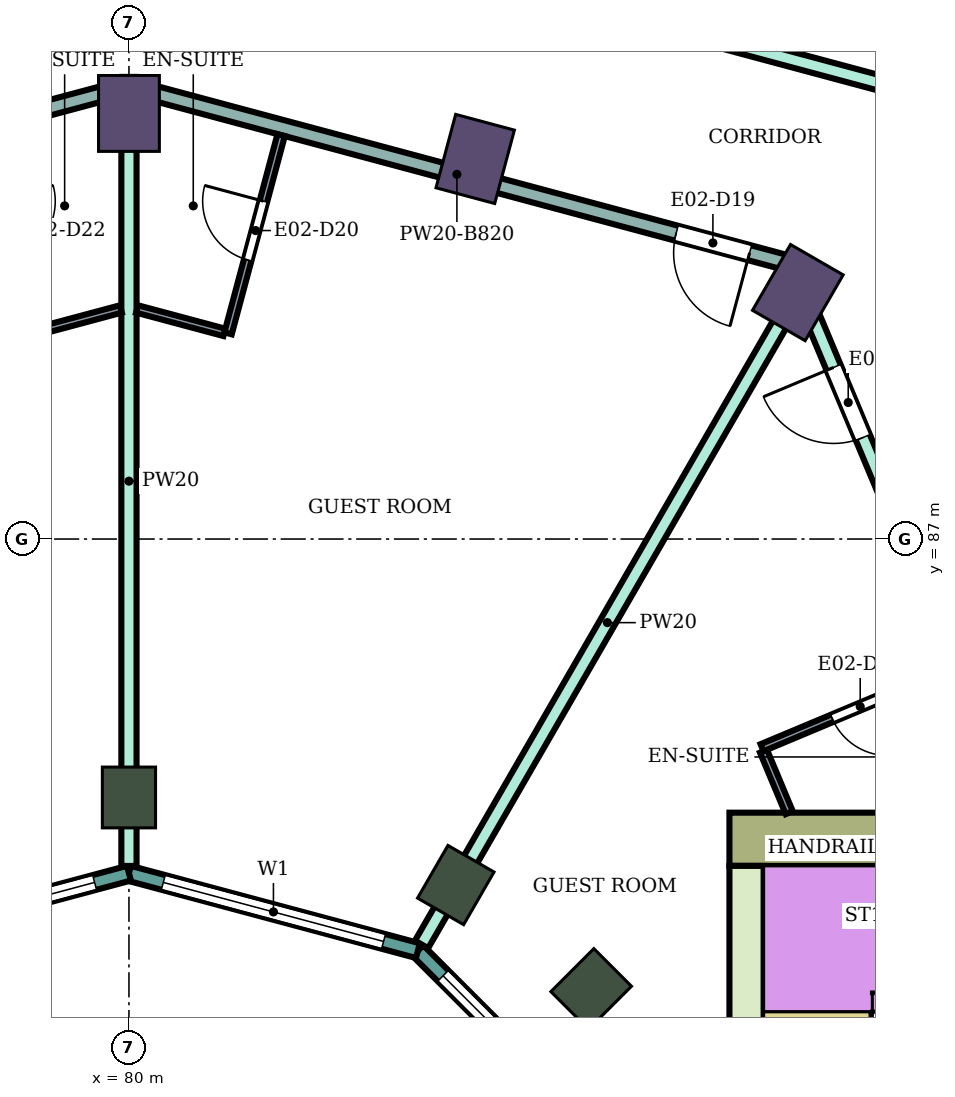
"""IFC4 building model, lengths in metres.
Left out: names, types, materials, properties, quantities, classifications, styles, units other than length and angle.
Written with IfcOpenShell. Run it as: python <this file> out.ifc"""

import sys

from ifc_helpers import new_model, si_unit, direction, frame, frame_2d, origin, origin_2d, place, context, subcontext, project, spatial, rectangle, extrude, element, fill, save


model = new_model("IFC4")
c1 = context("Model", 3, precision=1e-05, world=origin(), true_north=direction((0.0, 1.0)))
c2 = subcontext(c1, "Body", "Model", "MODEL_VIEW")
j1 = project(units=[si_unit("LENGTHUNIT", "METRE"), si_unit("PLANEANGLEUNIT", "RADIAN")], contexts=[c1])
p1 = place(None, origin())
s1 = spatial("IfcSite", under=j1, at=p1, CompositionType="ELEMENT")
p2 = place(p1, origin())
s2 = spatial("IfcBuilding", under=s1, at=p2, CompositionType="ELEMENT")
p3 = place(p2, frame((0.0, 0.0, 126.3)))
s3 = spatial("IfcBuildingStorey", under=s2, at=p3, CompositionType="ELEMENT", Elevation=126.3)
for number, where, z_axis, x_axis in (
    (1, (88.8, 90.242, 0.0), (0.0, 0.0, 1.0), (0.5, 0.866, 0.0)),
    (2, (84.555, 92.0, 0.0), (0.0, 0.0, 1.0), (0.259, 0.966, 0.0)),
    (3, (80.0, 92.6, 0.0), (0.0, 0.0, 1.0), (0.0, 1.0, 0.0)),
):
    element("IfcColumn", number, at=place(p3, frame(where, z_axis=z_axis, x_axis=x_axis)), inside=s3, PredefinedType="COLUMN", context=c2, shape_type="SweptSolid", body=[
        extrude(rectangle(XDim=1.0, YDim=0.8, at=origin_2d()), origin(), (0.0, 0.0, 1.0), 3.9),
    ])
for number, where, z_axis, x_axis in (
    (4, (86.081, 81.081, 0.0), (0.0, 0.0, 1.0), (0.707, 0.707, 0.0)),
    (5, (84.3, 82.448, 0.0), (0.0, 0.0, 1.0), (0.5, 0.866, 0.0)),
    (6, (80.0, 83.6, 0.0), (0.0, 0.0, 1.0), (0.0, 1.0, 0.0)),
):
    element("IfcColumn", number, at=place(p3, frame(where, z_axis=z_axis, x_axis=x_axis)), inside=s3, PredefinedType="COLUMN", context=c2, shape_type="SweptSolid", body=[
        extrude(rectangle(XDim=0.8, YDim=0.7, at=origin_2d()), origin(), (0.0, 0.0, 1.0), 3.9),
    ])
p4 = place(p3, frame((87.9, 83.05, 0.0), z_axis=(0.0, 0.0, 1.0), x_axis=(1.0, 0.0, 0.0)))
e7 = element("IfcWall", 7, at=p4, inside=s3, PredefinedType="SHEAR", context=c2, shape_type="SweptSolid", body=[
    extrude(rectangle(XDim=14.8, YDim=0.7, at=frame_2d((7.4, 0.0))), origin(), (0.0, 0.0, 1.0), 3.58),
])
p5 = place(p4, frame((4.2, 0.0, 0.0)))
e8 = element("IfcOpeningElement", 8, at=p5, cuts=e7, PredefinedType="OPENING", context=c2, shape_type="SweptSolid", body=[
    extrude(rectangle(XDim=2.4, YDim=2.4, at=frame_2d((1.2, 1.2))), frame((0.0, 0.36, 0.0), z_axis=(0.0, -1.0, 0.0), x_axis=(1.0, 0.0, 0.0)), (0.0, 0.0, 1.0), 0.72),
])
p6 = place(p3, frame((88.125, 75.0, 0.0), z_axis=(0.0, 0.0, 1.0), x_axis=(0.0, 1.0, 0.0)))
e9 = element("IfcWall", 9, at=p6, inside=s3, PredefinedType="SHEAR", context=c2, shape_type="SweptSolid", body=[
    extrude(rectangle(XDim=7.7, YDim=0.45, at=frame_2d((3.85, 0.0))), origin(), (0.0, 0.0, 1.0), 3.58),
])
p7 = place(p3, frame((86.585, 78.802, 0.0), z_axis=(0.0, 0.0, 1.0), x_axis=(-0.707106781187, 0.707106781187, 0.0)))
e10 = element("IfcWall", 10, at=p7, inside=s3, PredefinedType="NOTDEFINED", context=c2, shape_type="SweptSolid", body=[
    extrude(rectangle(XDim=3.936, YDim=0.2, at=frame_2d((1.968, 0.0))), origin(), (0.0, 0.0, 1.0), 3.9),
])
p8 = place(p7, frame((0.468, 0.0, 0.9)))
e11 = element("IfcOpeningElement", 11, at=p8, cuts=e10, PredefinedType="OPENING", context=c2, shape_type="SweptSolid", body=[
    extrude(rectangle(XDim=3.0, YDim=2.3, at=frame_2d((1.5, 1.15))), frame((0.0, 0.11, 0.0), z_axis=(0.0, -1.0, 0.0), x_axis=(1.0, 0.0, 0.0)), (0.0, 0.0, 1.0), 0.22),
])
p9 = place(p3, frame((83.802, 81.585, 0.0), z_axis=(0.0, 0.0, 1.0), x_axis=(-0.965933654434, 0.258789828301, 0.0)))
e12 = element("IfcWall", 12, at=p9, inside=s3, PredefinedType="NOTDEFINED", context=c2, shape_type="SweptSolid", body=[
    extrude(rectangle(XDim=3.936, YDim=0.2, at=frame_2d((1.968, 0.0))), origin(), (0.0, 0.0, 1.0), 3.9),
])
p10 = place(p9, frame((0.468, 0.0, 0.9)))
e13 = element("IfcOpeningElement", 13, at=p10, cuts=e12, PredefinedType="OPENING", context=c2, shape_type="SweptSolid", body=[
    extrude(rectangle(XDim=3.0, YDim=2.3, at=frame_2d((1.5, 1.15))), frame((0.0, 0.11, 0.0), z_axis=(0.0, -1.0, 0.0), x_axis=(1.0, 0.0, 0.0)), (0.0, 0.0, 1.0), 0.22),
])
p11 = place(p3, frame((80.0, 82.604, 0.0), z_axis=(0.0, 0.0, 1.0), x_axis=(-0.965933654434, -0.258789828301, 0.0)))
e14 = element("IfcWall", 14, at=p11, inside=s3, PredefinedType="NOTDEFINED", context=c2, shape_type="SweptSolid", body=[
    extrude(rectangle(XDim=3.936, YDim=0.2, at=frame_2d((1.968, 0.0))), origin(), (0.0, 0.0, 1.0), 3.9),
])
p12 = place(p11, frame((0.468, 0.0, 0.9)))
e15 = element("IfcOpeningElement", 15, at=p12, cuts=e14, PredefinedType="OPENING", context=c2, shape_type="SweptSolid", body=[
    extrude(rectangle(XDim=3.0, YDim=2.3, at=frame_2d((1.5, 1.15))), frame((0.0, 0.11, 0.0), z_axis=(0.0, -1.0, 0.0), x_axis=(1.0, 0.0, 0.0)), (0.0, 0.0, 1.0), 0.22),
])
p13 = place(p3, frame((69.397, 92.805, 0.0), z_axis=(0.0, 0.0, 1.0), x_axis=(0.965971666602, 0.258647906087, 0.0)))
e16 = element("IfcWall", 16, at=p13, inside=s3, PredefinedType="PARTITIONING", context=c2, shape_type="SweptSolid", body=[
    extrude(rectangle(XDim=10.887, YDim=0.2, at=frame_2d((5.443, 0.0))), origin(), (0.0, 0.0, 1.0), 3.45),
])
p14 = place(p13, frame((6.163, 0.0, 0.0)))
e17 = element("IfcOpeningElement", 17, at=p14, cuts=e16, PredefinedType="OPENING", context=c2, shape_type="SweptSolid", body=[
    extrude(rectangle(XDim=1.0, YDim=2.1, at=frame_2d((0.5, 1.05))), frame((0.0, 0.11, 0.0), z_axis=(0.0, -1.0, 0.0), x_axis=(1.0, 0.0, 0.0)), (0.0, 0.0, 1.0), 0.22),
])
p15 = place(p13, frame((2.461, 0.0, 0.0)))
e18 = element("IfcOpeningElement", 18, at=p15, cuts=e16, PredefinedType="OPENING", context=c2, shape_type="SweptSolid", body=[
    extrude(rectangle(XDim=1.0, YDim=2.1, at=frame_2d((0.5, 1.05))), frame((0.0, 0.11, 0.0), z_axis=(0.0, -1.0, 0.0), x_axis=(1.0, 0.0, 0.0)), (0.0, 0.0, 1.0), 0.22),
])
p16 = place(p3, frame((71.303, 90.625, 0.0), z_axis=(0.0, 0.0, 1.0), x_axis=(0.965971868307, 0.258647152776, 0.0)))
e19 = element("IfcWall", 19, at=p16, inside=s3, PredefinedType="PARTITIONING", context=c2, shape_type="SweptSolid", body=[
    extrude(rectangle(XDim=8.874, YDim=0.2, at=frame_2d((4.437, 0.0))), origin(), (0.0, 0.0, 1.0), 3.08),
])
p17 = place(p16, frame((0.55, 0.0, 0.0)))
e20 = element("IfcOpeningElement", 20, at=p17, cuts=e19, PredefinedType="OPENING", context=c2, shape_type="SweptSolid", body=[
    extrude(rectangle(XDim=1.0, YDim=2.1, at=frame_2d((0.5, 1.05))), frame((0.0, 0.11, 0.0), z_axis=(0.0, -1.0, 0.0), x_axis=(1.0, 0.0, 0.0)), (0.0, 0.0, 1.0), 0.22),
])
p18 = place(p3, frame((80.0, 82.699, 0.0), z_axis=(0.0, 0.0, 1.0), x_axis=(0.0, 1.0, 0.0)))
e21 = element("IfcWall", 21, at=p18, inside=s3, PredefinedType="PARTITIONING", context=c2, shape_type="SweptSolid", body=[
    extrude(rectangle(XDim=10.125, YDim=0.2, at=frame_2d((5.062, 0.0))), origin(), (0.0, 0.0, 1.0), 3.45),
])
p19 = place(p3, frame((80.0, 92.954, 0.0), z_axis=(0.0, 0.0, 1.0), x_axis=(0.96592536278, -0.258820774936, 0.0)))
e22 = element("IfcWall", 22, at=p19, inside=s3, PredefinedType="PARTITIONING", context=c2, shape_type="SweptSolid", body=[
    extrude(rectangle(XDim=8.934, YDim=0.2, at=frame_2d((4.467, 0.0))), origin(), (0.0, 0.0, 1.0), 3.08),
])
p20 = place(p19, frame((7.454, 0.0, 0.0)))
e23 = element("IfcOpeningElement", 23, at=p20, cuts=e22, PredefinedType="OPENING", context=c2, shape_type="SweptSolid", body=[
    extrude(rectangle(XDim=1.0, YDim=2.1, at=frame_2d((0.5, 1.05))), frame((0.0, 0.11, 0.0), z_axis=(0.0, -1.0, 0.0), x_axis=(1.0, 0.0, 0.0)), (0.0, 0.0, 1.0), 0.22),
])
p21 = place(p3, frame((80.0, 95.648, 0.0), z_axis=(0.0, 0.0, 1.0), x_axis=(0.965852259202, -0.259093445292, 0.0)))
e24 = element("IfcWall", 24, at=p21, inside=s3, PredefinedType="PARTITIONING", context=c2, shape_type="SweptSolid", body=[
    extrude(rectangle(XDim=10.597, YDim=0.2, at=frame_2d((5.298, 0.0))), origin(), (0.0, 0.0, 1.0), 3.45),
])
p22 = place(p21, frame((1.0, 0.0, 0.0)))
e25 = element("IfcOpeningElement", 25, at=p22, cuts=e24, PredefinedType="OPENING", context=c2, shape_type="SweptSolid", body=[
    extrude(rectangle(XDim=1.0, YDim=2.1, at=frame_2d((0.5, 1.05))), frame((0.0, 0.11, 0.0), z_axis=(0.0, -1.0, 0.0), x_axis=(1.0, 0.0, 0.0)), (0.0, 0.0, 1.0), 0.22),
])
p23 = place(p3, frame((83.85, 81.667, 0.0), z_axis=(0.0, 0.0, 1.0), x_axis=(0.500092047414, 0.865972253663, 0.0)))
e26 = element("IfcWall", 26, at=p23, inside=s3, PredefinedType="PARTITIONING", context=c2, shape_type="SweptSolid", body=[
    extrude(rectangle(XDim=9.778, YDim=0.2, at=frame_2d((4.889, 0.0))), origin(), (0.0, 0.0, 1.0), 3.45),
])
p24 = place(p3, frame((88.698, 90.624, 0.0), z_axis=(0.0, 0.0, 1.0), x_axis=(0.386027055918, -0.922487459047, 0.0)))
e27 = element("IfcWall", 27, at=p24, inside=s3, PredefinedType="PARTITIONING", context=c2, shape_type="SweptSolid", body=[
    extrude(rectangle(XDim=7.832, YDim=0.2, at=frame_2d((3.916, 0.0))), origin(), (0.0, 0.0, 1.0), 3.45),
])
p25 = place(p24, frame((1.482, 0.0, 0.0)))
e28 = element("IfcOpeningElement", 28, at=p25, cuts=e27, PredefinedType="OPENING", context=c2, shape_type="SweptSolid", body=[
    extrude(rectangle(XDim=1.0, YDim=2.1, at=frame_2d((0.5, 1.05))), frame((0.0, 0.11, 0.0), z_axis=(0.0, -1.0, 0.0), x_axis=(1.0, 0.0, 0.0)), (0.0, 0.0, 1.0), 0.22),
])
p26 = place(p3, frame((78.696, 89.706, 0.0), z_axis=(0.0, 0.0, 1.0), x_axis=(0.966002513606, 0.258532674351, 0.0)))
e29 = element("IfcWall", 29, at=p26, inside=s3, PredefinedType="PARTITIONING", context=c2, shape_type="SweptSolid", body=[
    extrude(rectangle(XDim=1.24, YDim=0.1, at=frame_2d((0.62, 0.0))), origin(), (0.0, 0.0, 1.0), 3.45),
])
p27 = place(p3, frame((80.106, 90.027, 0.0), z_axis=(0.0, 0.0, 1.0), x_axis=(0.966002973184, -0.258530957139, 0.0)))
e30 = element("IfcWall", 30, at=p27, inside=s3, PredefinedType="PARTITIONING", context=c2, shape_type="SweptSolid", body=[
    extrude(rectangle(XDim=1.19, YDim=0.1, at=frame_2d((0.595, 0.0))), origin(), (0.0, 0.0, 1.0), 3.45),
])
p28 = place(p3, frame((81.304, 89.706, 0.0), z_axis=(0.0, 0.0, 1.0), x_axis=(0.258608022684, 0.965982344872, 0.0)))
e31 = element("IfcWall", 31, at=p28, inside=s3, PredefinedType="PARTITIONING", context=c2, shape_type="SweptSolid", body=[
    extrude(rectangle(XDim=2.7, YDim=0.1, at=frame_2d((1.35, 0.0))), origin(), (0.0, 0.0, 1.0), 3.45),
])
p29 = place(p28, frame((1.0, 0.0, 0.0)))
e32 = element("IfcOpeningElement", 32, at=p29, cuts=e31, PredefinedType="OPENING", context=c2, shape_type="SweptSolid", body=[
    extrude(rectangle(XDim=0.8, YDim=2.1, at=frame_2d((0.4, 1.05))), frame((0.0, 0.06, 0.0), z_axis=(0.0, -1.0, 0.0), x_axis=(1.0, 0.0, 0.0)), (0.0, 0.0, 1.0), 0.12),
])
p30 = place(p3, frame((88.348, 84.209, 0.0), z_axis=(0.0, 0.0, 1.0), x_axis=(0.386077497504, -0.922466349479, 0.0)))
e33 = element("IfcWall", 33, at=p30, inside=s3, PredefinedType="PARTITIONING", context=c2, shape_type="SweptSolid", body=[
    extrude(rectangle(XDim=0.877, YDim=0.1, at=frame_2d((0.438, 0.0))), origin(), (0.0, 0.0, 1.0), 3.45),
])
p31 = place(p3, frame((88.329, 84.255, 0.0), z_axis=(0.0, 0.0, 1.0), x_axis=(0.922320663728, 0.386425404522, 0.0)))
e34 = element("IfcWall", 34, at=p31, inside=s3, PredefinedType="PARTITIONING", context=c2, shape_type="SweptSolid", body=[
    extrude(rectangle(XDim=2.69, YDim=0.1, at=frame_2d((1.345, 0.0))), origin(), (0.0, 0.0, 1.0), 3.45),
])
p32 = place(p31, frame((1.0, 0.0, 0.0)))
e35 = element("IfcOpeningElement", 35, at=p32, cuts=e34, PredefinedType="OPENING", context=c2, shape_type="SweptSolid", body=[
    extrude(rectangle(XDim=0.8, YDim=2.1, at=frame_2d((0.4, 1.05))), frame((0.0, 0.06, 0.0), z_axis=(0.0, -1.0, 0.0), x_axis=(1.0, 0.0, 0.0)), (0.0, 0.0, 1.0), 0.12),
])
p33 = place(p8, origin())
e36 = element("IfcWindow", 36, at=p33, inside=s3, PartitioningType="SINGLE_PANEL", PredefinedType="WINDOW", context=c2, shape_type="SweptSolid", body=[
    extrude(rectangle(XDim=3.0, YDim=2.3, at=frame_2d((1.5, 1.15))), frame((0.0, 0.03, 0.0), z_axis=(0.0, -1.0, 0.0), x_axis=(1.0, 0.0, 0.0)), (0.0, 0.0, 1.0), 0.06),
])
fill(e11, e36)
p34 = place(p10, origin())
e37 = element("IfcWindow", 37, at=p34, inside=s3, PartitioningType="SINGLE_PANEL", PredefinedType="WINDOW", context=c2, shape_type="SweptSolid", body=[
    extrude(rectangle(XDim=3.0, YDim=2.3, at=frame_2d((1.5, 1.15))), frame((0.0, 0.03, 0.0), z_axis=(0.0, -1.0, 0.0), x_axis=(1.0, 0.0, 0.0)), (0.0, 0.0, 1.0), 0.06),
])
fill(e13, e37)
p35 = place(p12, origin())
e38 = element("IfcWindow", 38, at=p35, inside=s3, PartitioningType="SINGLE_PANEL", PredefinedType="WINDOW", context=c2, shape_type="SweptSolid", body=[
    extrude(rectangle(XDim=3.0, YDim=2.3, at=frame_2d((1.5, 1.15))), frame((0.0, 0.03, 0.0), z_axis=(0.0, -1.0, 0.0), x_axis=(1.0, 0.0, 0.0)), (0.0, 0.0, 1.0), 0.06),
])
fill(e15, e38)
p36 = place(p25, frame((1.0, 0.0, 0.0), z_axis=(0.0, 0.0, 1.0), x_axis=(-1.0, 0.0, 0.0)))
e39 = element("IfcDoor", 39, at=p36, inside=s3, OperationType="SINGLE_SWING_RIGHT", PredefinedType="DOOR", context=c2, shape_type="SweptSolid", body=[
    extrude(rectangle(XDim=1.0, YDim=2.1, at=frame_2d((0.5, 1.05))), frame((0.0, 0.025, 0.0), z_axis=(0.0, -1.0, 0.0), x_axis=(1.0, 0.0, 0.0)), (0.0, 0.0, 1.0), 0.05),
])
fill(e28, e39)
p37 = place(p32, frame((0.8, 0.0, 0.0), z_axis=(0.0, 0.0, 1.0), x_axis=(-1.0, 0.0, 0.0)))
e40 = element("IfcDoor", 40, at=p37, inside=s3, OperationType="SINGLE_SWING_LEFT", PredefinedType="DOOR", context=c2, shape_type="SweptSolid", body=[
    extrude(rectangle(XDim=0.8, YDim=2.1, at=frame_2d((0.4, 1.05))), frame((0.0, 0.025, 0.0), z_axis=(0.0, -1.0, 0.0), x_axis=(1.0, 0.0, 0.0)), (0.0, 0.0, 1.0), 0.05),
])
fill(e35, e40)
p38 = place(p20, frame((1.0, 0.0, 0.0), z_axis=(0.0, 0.0, 1.0), x_axis=(-1.0, 0.0, 0.0)))
e41 = element("IfcDoor", 41, at=p38, inside=s3, OperationType="SINGLE_SWING_LEFT", PredefinedType="DOOR", context=c2, shape_type="SweptSolid", body=[
    extrude(rectangle(XDim=1.0, YDim=2.1, at=frame_2d((0.5, 1.05))), frame((0.0, 0.025, 0.0), z_axis=(0.0, -1.0, 0.0), x_axis=(1.0, 0.0, 0.0)), (0.0, 0.0, 1.0), 0.05),
])
fill(e23, e41)
p39 = place(p29, origin())
e42 = element("IfcDoor", 42, at=p39, inside=s3, OperationType="SINGLE_SWING_RIGHT", PredefinedType="DOOR", context=c2, shape_type="SweptSolid", body=[
    extrude(rectangle(XDim=0.8, YDim=2.1, at=frame_2d((0.4, 1.05))), frame((0.0, 0.025, 0.0), z_axis=(0.0, -1.0, 0.0), x_axis=(1.0, 0.0, 0.0)), (0.0, 0.0, 1.0), 0.05),
])
fill(e32, e42)
save(model, sys.argv[1])
